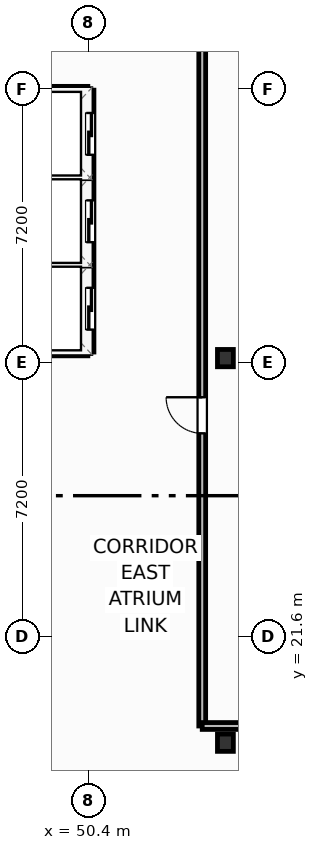
"""IFC4 building model, lengths in metres.
Left out: names, types, materials, properties, quantities, classifications, styles, units other than length and angle.
Written with IfcOpenShell. Run it as: python <this file> out.ifc"""

import sys

from ifc_helpers import new_model, si_unit, direction, frame, frame_2d, origin, origin_2d, place, context, subcontext, project, spatial, rectangle, i_section, extrude, element, fill, save


model = new_model("IFC4")
c1 = context("Model", 3, precision=1e-05, world=origin(), true_north=direction((0.0, 1.0)))
c2 = subcontext(c1, "Body", "Model", "MODEL_VIEW")
j1 = project(units=[si_unit("LENGTHUNIT", "METRE"), si_unit("PLANEANGLEUNIT", "RADIAN")], contexts=[c1])
p1 = place(None, origin())
s1 = spatial("IfcSite", under=j1, at=p1, CompositionType="ELEMENT")
p2 = place(p1, origin())
s2 = spatial("IfcBuilding", under=s1, at=p2, CompositionType="ELEMENT")
p3 = place(p2, frame((0.0, 0.0, 174.6)))
s3 = spatial("IfcBuildingStorey", under=s2, at=p3, CompositionType="ELEMENT", Elevation=174.6)
for number, where, z_axis, x_axis in (
    (1, (54.0, 18.8, 0.0), (0.0, 0.0, 1.0), (1.0, 0.0, 0.0)),
    (2, (54.0, 28.92, 0.0), (0.0, 0.0, 1.0), (1.0, 0.0, 0.0)),
):
    element("IfcColumn", number, at=place(p3, frame(where, z_axis=z_axis, x_axis=x_axis)), inside=s3, PredefinedType="COLUMN", context=c2, shape_type="SweptSolid", body=[
        extrude(i_section(OverallWidth=0.418, OverallDepth=0.455, WebThickness=0.042, FlangeThickness=0.068, FilletRadius=0.025, at=origin_2d()), origin(), (0.0, 0.0, 1.0), 3.7),
    ])
p4 = place(p3, frame((53.39, 19.24, 0.0), z_axis=(0.0, 0.0, 1.0), x_axis=(0.0, 1.0, 0.0)))
e3 = element("IfcWall", 3, at=p4, inside=s3, PredefinedType="PARTITIONING", context=c2, shape_type="SweptSolid", body=[
    extrude(rectangle(XDim=20.06, YDim=0.18, at=frame_2d((10.03, 0.0))), origin(), (0.0, 0.0, 1.0), 3.45),
])
p5 = place(p4, frame((7.7, 0.0, 0.0)))
e4 = element("IfcOpeningElement", 4, at=p5, cuts=e3, PredefinedType="OPENING", context=c2, shape_type="SweptSolid", body=[
    extrude(rectangle(XDim=0.95, YDim=2.05, at=frame_2d((0.475, 1.025))), frame((0.0, 0.1, 0.0), z_axis=(0.0, -1.0, 0.0), x_axis=(1.0, 0.0, 0.0)), (0.0, 0.0, 1.0), 0.2),
])
p6 = place(p3, frame((53.39, 19.24, 0.0), z_axis=(0.0, 0.0, 1.0), x_axis=(1.0, 0.0, 0.0)))
e5 = element("IfcWall", 5, at=p6, inside=s3, PredefinedType="PARTITIONING", context=c2, shape_type="SweptSolid", body=[
    extrude(rectangle(XDim=21.922, YDim=0.18, at=frame_2d((10.961, 0.0))), origin(), (0.0, 0.0, 1.0), 2.662),
])
for number, where, z_axis, x_axis in (
    (6, (48.32, 31.375, 0.0), (0.0, 0.0, 1.0), (1.0, 0.0, 0.0)),
    (7, (48.32, 33.675, 0.0), (0.0, 0.0, 1.0), (1.0, 0.0, 0.0)),
):
    element("IfcWall", number, at=place(p3, frame(where, z_axis=z_axis, x_axis=x_axis)), inside=s3, PredefinedType="PARTITIONING", context=c2, shape_type="SweptSolid", body=[
        extrude(rectangle(XDim=2.06, YDim=0.2, at=frame_2d((1.03, 0.0))), origin(), (0.0, 0.0, 1.0), 3.45),
    ])
p7 = place(p3, frame((48.32, 29.08, 0.0), z_axis=(0.0, 0.0, 1.0), x_axis=(1.0, 0.0, 0.0)))
e8 = element("IfcWall", 8, at=p7, inside=s3, PredefinedType="PARTITIONING", context=c2, shape_type="SweptSolid", body=[
    extrude(rectangle(XDim=2.06, YDim=0.2, at=frame_2d((1.03, 0.0))), origin(), (0.0, 0.0, 1.0), 2.662),
])
p8 = place(p3, frame((48.32, 35.97, 0.0), z_axis=(0.0, 0.0, 1.0), x_axis=(1.0, 0.0, 0.0)))
e9 = element("IfcWall", 9, at=p8, inside=s3, PredefinedType="PARTITIONING", context=c2, shape_type="SweptSolid", body=[
    extrude(rectangle(XDim=2.06, YDim=0.2, at=frame_2d((1.03, 0.0))), origin(), (0.0, 0.0, 1.0), 3.45),
])
p9 = place(p3, frame((50.44, 29.08, 0.0), z_axis=(0.0, 0.0, 1.0), x_axis=(0.0, 1.0, 0.0)))
e10 = element("IfcWall", 10, at=p9, inside=s3, PredefinedType="PARTITIONING", context=c2, shape_type="SweptSolid", body=[
    extrude(rectangle(XDim=6.89, YDim=0.2, at=frame_2d((3.445, 0.0))), origin(), (0.0, 0.0, 1.0), 3.45),
])
p10 = place(p9, frame((0.59, 0.0, 0.0)))
e11 = element("IfcOpeningElement", 11, at=p10, cuts=e10, PredefinedType="OPENING", context=c2, shape_type="SweptSolid", body=[
    extrude(rectangle(XDim=1.1, YDim=2.15, at=frame_2d((0.55, 1.075))), frame((0.0, 0.11, 0.0), z_axis=(0.0, -1.0, 0.0), x_axis=(1.0, 0.0, 0.0)), (0.0, 0.0, 1.0), 0.22),
])
p11 = place(p9, frame((2.89, 0.0, 0.0)))
e12 = element("IfcOpeningElement", 12, at=p11, cuts=e10, PredefinedType="OPENING", context=c2, shape_type="SweptSolid", body=[
    extrude(rectangle(XDim=1.1, YDim=2.15, at=frame_2d((0.55, 1.075))), frame((0.0, 0.11, 0.0), z_axis=(0.0, -1.0, 0.0), x_axis=(1.0, 0.0, 0.0)), (0.0, 0.0, 1.0), 0.22),
])
p12 = place(p9, frame((5.19, 0.0, 0.0)))
e13 = element("IfcOpeningElement", 13, at=p12, cuts=e10, PredefinedType="OPENING", context=c2, shape_type="SweptSolid", body=[
    extrude(rectangle(XDim=1.1, YDim=2.15, at=frame_2d((0.55, 1.075))), frame((0.0, 0.11, 0.0), z_axis=(0.0, -1.0, 0.0), x_axis=(1.0, 0.0, 0.0)), (0.0, 0.0, 1.0), 0.22),
])
p13 = place(p5, origin())
e14 = element("IfcDoor", 14, at=p13, inside=s3, OperationType="SINGLE_SWING_RIGHT", PredefinedType="DOOR", context=c2, shape_type="SweptSolid", body=[
    extrude(rectangle(XDim=0.95, YDim=2.05, at=frame_2d((0.475, 1.025))), frame((0.0, 0.025, 0.0), z_axis=(0.0, -1.0, 0.0), x_axis=(1.0, 0.0, 0.0)), (0.0, 0.0, 1.0), 0.05),
])
fill(e4, e14)
p14 = place(p10, origin())
e15 = element("IfcDoor", 15, at=p14, inside=s3, OperationType="SLIDING_TO_LEFT", PredefinedType="DOOR", context=c2, shape_type="SweptSolid", body=[
    extrude(rectangle(XDim=1.1, YDim=2.15, at=frame_2d((0.55, 1.075))), frame((0.0, 0.025, 0.0), z_axis=(0.0, -1.0, 0.0), x_axis=(1.0, 0.0, 0.0)), (0.0, 0.0, 1.0), 0.05),
])
fill(e11, e15)
p15 = place(p11, origin())
e16 = element("IfcDoor", 16, at=p15, inside=s3, OperationType="SLIDING_TO_LEFT", PredefinedType="DOOR", context=c2, shape_type="SweptSolid", body=[
    extrude(rectangle(XDim=1.1, YDim=2.15, at=frame_2d((0.55, 1.075))), frame((0.0, 0.025, 0.0), z_axis=(0.0, -1.0, 0.0), x_axis=(1.0, 0.0, 0.0)), (0.0, 0.0, 1.0), 0.05),
])
fill(e12, e16)
p16 = place(p12, origin())
e17 = element("IfcDoor", 17, at=p16, inside=s3, OperationType="SLIDING_TO_LEFT", PredefinedType="DOOR", context=c2, shape_type="SweptSolid", body=[
    extrude(rectangle(XDim=1.1, YDim=2.15, at=frame_2d((0.55, 1.075))), frame((0.0, 0.025, 0.0), z_axis=(0.0, -1.0, 0.0), x_axis=(1.0, 0.0, 0.0)), (0.0, 0.0, 1.0), 0.05),
])
fill(e13, e17)
save(model, sys.argv[1])
